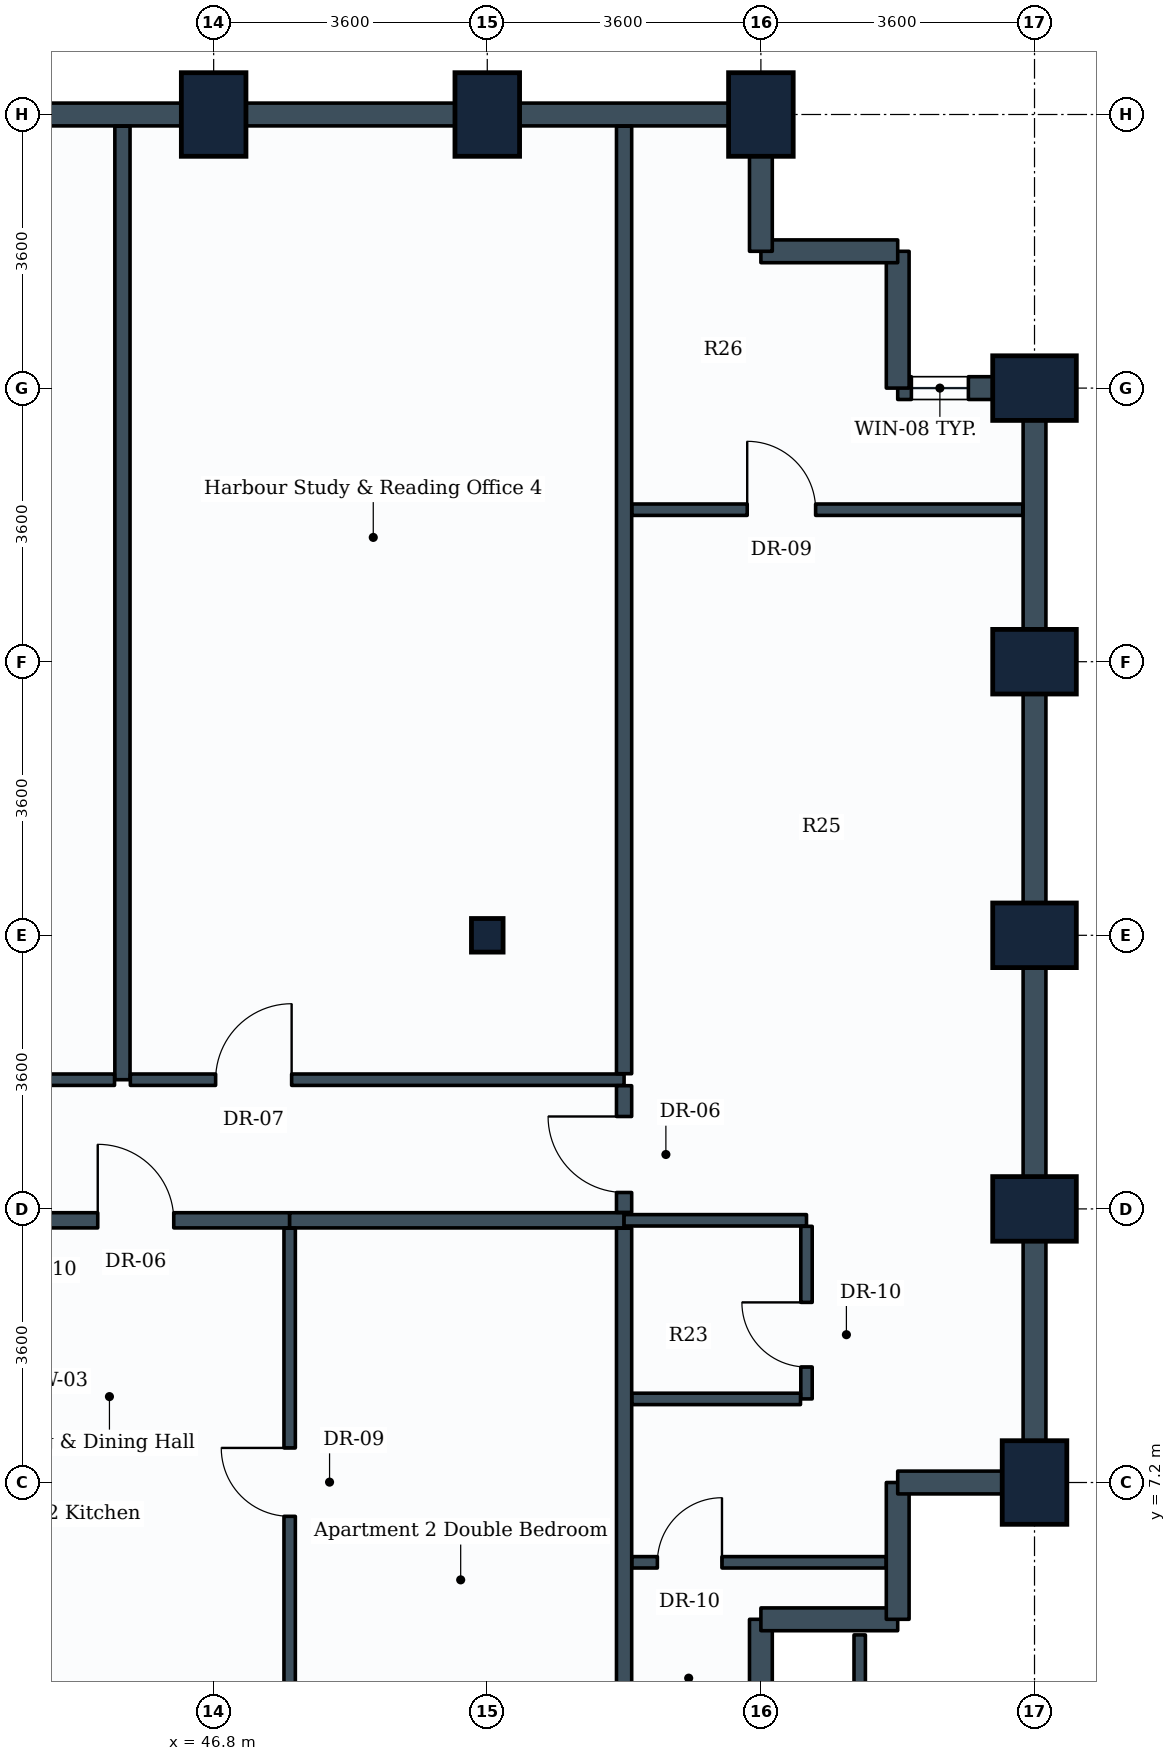
"""IFC4 building model, lengths in metres.
Left out: names, types, materials, properties, quantities, classifications, styles, units other than length and angle.
Written with IfcOpenShell. Run it as: python <this file> out.ifc"""

import sys

from ifc_helpers import new_model, si_unit, direction, frame, frame_2d, origin, origin_2d, place, context, subcontext, project, spatial, rectangle, i_section, extrude, element, fill, save


model = new_model("IFC4")
c1 = context("Model", 3, precision=1e-05, world=origin(), true_north=direction((0.0, 1.0)))
c2 = subcontext(c1, "Body", "Model", "MODEL_VIEW")
j1 = project(units=[si_unit("LENGTHUNIT", "METRE"), si_unit("PLANEANGLEUNIT", "RADIAN")], contexts=[c1])
p1 = place(None, origin())
s1 = spatial("IfcSite", under=j1, at=p1, CompositionType="ELEMENT")
p2 = place(p1, origin())
s2 = spatial("IfcBuilding", under=s1, at=p2, CompositionType="ELEMENT")
p3 = place(p2, frame((0.0, 0.0, 123.8)))
s3 = spatial("IfcBuildingStorey", under=s2, at=p3, CompositionType="ELEMENT", Elevation=123.8)
p4 = place(p3, frame((46.8, 25.2, 0.0), z_axis=(0.0, 0.0, 1.0), x_axis=(1.0, 0.0, 0.0)))
e1 = element("IfcColumn", 1, at=p4, inside=s3, PredefinedType="COLUMN", context=c2, shape_type="SweptSolid", body=[
    extrude(rectangle(XDim=0.85, YDim=1.1, at=origin_2d()), origin(), (0.0, 0.0, 1.0), 3.8),
])
p5 = place(p3, frame((50.4, 14.4, 0.0), z_axis=(0.0, 0.0, 1.0), x_axis=(1.0, 0.0, 0.0)))
e2 = element("IfcColumn", 2, at=p5, inside=s3, PredefinedType="COLUMN", context=c2, shape_type="SweptSolid", body=[
    extrude(i_section(OverallWidth=0.416, OverallDepth=0.442, WebThickness=0.025, FlangeThickness=0.041, FilletRadius=0.015, at=origin_2d()), origin(), (0.0, 0.0, 1.0), 3.8),
])
for number, where, z_axis, x_axis in (
    (3, (50.4, 25.2, 0.0), (0.0, 0.0, 1.0), (1.0, 0.0, 0.0)),
    (4, (54.0, 25.2, 0.0), (0.0, 0.0, 1.0), (1.0, 0.0, 0.0)),
    (5, (57.6, 7.2, 0.0), (0.0, 0.0, 1.0), (1.0, 0.0, 0.0)),
    (6, (57.6, 10.8, 0.0), (0.0, 0.0, 1.0), (0.0, 1.0, 0.0)),
    (7, (57.6, 14.4, 0.0), (0.0, 0.0, 1.0), (0.0, 1.0, 0.0)),
    (8, (57.6, 18.0, 0.0), (0.0, 0.0, 1.0), (0.0, 1.0, 0.0)),
    (9, (57.6, 21.6, 0.0), (0.0, 0.0, 1.0), (0.0, 1.0, 0.0)),
):
    element("IfcColumn", number, at=place(p3, frame(where, z_axis=z_axis, x_axis=x_axis)), inside=s3, PredefinedType="COLUMN", context=c2, shape_type="SweptSolid", body=[
        extrude(rectangle(XDim=0.85, YDim=1.1, at=origin_2d()), origin(), (0.0, 0.0, 1.0), 3.8),
    ])
p6 = place(p3, frame((54.0, 5.4, 0.0), z_axis=(0.0, 0.0, 1.0), x_axis=(0.0, -1.0, 0.0)))
e10 = element("IfcWall", 10, at=p6, inside=s3, PredefinedType="STANDARD", context=c2, shape_type="SweptSolid", body=[
    extrude(rectangle(XDim=1.8, YDim=0.3, at=frame_2d((0.9, 0.0))), origin(), (0.0, 0.0, 1.0), 2.43),
])
p7 = place(p3, frame((55.8, 5.4, 0.0), z_axis=(0.0, 0.0, 1.0), x_axis=(-1.0, 0.0, 0.0)))
e11 = element("IfcWall", 11, at=p7, inside=s3, PredefinedType="STANDARD", context=c2, shape_type="SweptSolid", body=[
    extrude(rectangle(XDim=1.8, YDim=0.3, at=frame_2d((0.9, 0.0))), origin(), (0.0, 0.0, 1.0), 2.43),
])
p8 = place(p3, frame((55.8, 7.2, 0.0), z_axis=(0.0, 0.0, 1.0), x_axis=(0.0, -1.0, 0.0)))
e12 = element("IfcWall", 12, at=p8, inside=s3, PredefinedType="STANDARD", context=c2, shape_type="SweptSolid", body=[
    extrude(rectangle(XDim=1.8, YDim=0.3, at=frame_2d((0.9, 0.0))), origin(), (0.0, 0.0, 1.0), 3.465),
])
p9 = place(p3, frame((57.6, 7.2, 0.0), z_axis=(0.0, 0.0, 1.0), x_axis=(-1.0, 0.0, 0.0)))
e13 = element("IfcWall", 13, at=p9, inside=s3, PredefinedType="STANDARD", context=c2, shape_type="SweptSolid", body=[
    extrude(rectangle(XDim=1.8, YDim=0.3, at=frame_2d((0.9, 0.0))), origin(), (0.0, 0.0, 1.0), 2.43),
])
p10 = place(p3, frame((57.6, 10.8, 0.0), z_axis=(0.0, 0.0, 1.0), x_axis=(0.0, -1.0, 0.0)))
e14 = element("IfcWall", 14, at=p10, inside=s3, PredefinedType="STANDARD", context=c2, shape_type="SweptSolid", body=[
    extrude(rectangle(XDim=3.6, YDim=0.3, at=frame_2d((1.8, 0.0))), origin(), (0.0, 0.0, 1.0), 2.43),
])
p11 = place(p3, frame((57.6, 14.4, 0.0), z_axis=(0.0, 0.0, 1.0), x_axis=(0.0, -1.0, 0.0)))
e15 = element("IfcWall", 15, at=p11, inside=s3, PredefinedType="STANDARD", context=c2, shape_type="SweptSolid", body=[
    extrude(rectangle(XDim=3.6, YDim=0.3, at=frame_2d((1.8, 0.0))), origin(), (0.0, 0.0, 1.0), 2.43),
])
for number, where, z_axis, x_axis in (
    (16, (57.6, 18.0, 0.0), (0.0, 0.0, 1.0), (0.0, -1.0, 0.0)),
    (17, (57.6, 21.6, 0.0), (0.0, 0.0, 1.0), (0.0, -1.0, 0.0)),
):
    element("IfcWall", number, at=place(p3, frame(where, z_axis=z_axis, x_axis=x_axis)), inside=s3, PredefinedType="STANDARD", context=c2, shape_type="SweptSolid", body=[
        extrude(rectangle(XDim=3.6, YDim=0.3, at=frame_2d((1.8, 0.0))), origin(), (0.0, 0.0, 1.0), 2.43),
    ])
p12 = place(p3, frame((55.8, 21.6, 0.0), z_axis=(0.0, 0.0, 1.0), x_axis=(1.0, 0.0, 0.0)))
e18 = element("IfcWall", 18, at=p12, inside=s3, PredefinedType="STANDARD", context=c2, shape_type="SweptSolid", body=[
    extrude(rectangle(XDim=1.8, YDim=0.3, at=frame_2d((0.9, 0.0))), origin(), (0.0, 0.0, 1.0), 2.43),
])
p13 = place(p12, frame((0.18, 0.0, 0.85)))
e19 = element("IfcOpeningElement", 19, at=p13, cuts=e18, PredefinedType="OPENING", context=c2, shape_type="SweptSolid", body=[
    extrude(rectangle(XDim=0.75, YDim=1.05, at=frame_2d((0.375, 0.525))), frame((0.0, 0.16, 0.0), z_axis=(0.0, -1.0, 0.0), x_axis=(1.0, 0.0, 0.0)), (0.0, 0.0, 1.0), 0.32),
])
p14 = place(p3, frame((55.8, 23.4, 0.0), z_axis=(0.0, 0.0, 1.0), x_axis=(0.0, -1.0, 0.0)))
e20 = element("IfcWall", 20, at=p14, inside=s3, PredefinedType="STANDARD", context=c2, shape_type="SweptSolid", body=[
    extrude(rectangle(XDim=1.8, YDim=0.3, at=frame_2d((0.9, 0.0))), origin(), (0.0, 0.0, 1.0), 3.465),
])
for number, where, z_axis, x_axis in (
    (21, (54.0, 23.4, 0.0), (0.0, 0.0, 1.0), (1.0, 0.0, 0.0)),
    (22, (54.0, 25.2, 0.0), (0.0, 0.0, 1.0), (0.0, -1.0, 0.0)),
):
    element("IfcWall", number, at=place(p3, frame(where, z_axis=z_axis, x_axis=x_axis)), inside=s3, PredefinedType="STANDARD", context=c2, shape_type="SweptSolid", body=[
        extrude(rectangle(XDim=1.8, YDim=0.3, at=frame_2d((0.9, 0.0))), origin(), (0.0, 0.0, 1.0), 2.43),
    ])
p15 = place(p3, frame((50.4, 25.2, 0.0), z_axis=(0.0, 0.0, 1.0), x_axis=(1.0, 0.0, 0.0)))
e23 = element("IfcWall", 23, at=p15, inside=s3, PredefinedType="STANDARD", context=c2, shape_type="SweptSolid", body=[
    extrude(rectangle(XDim=3.6, YDim=0.3, at=frame_2d((1.8, 0.0))), origin(), (0.0, 0.0, 1.0), 2.43),
])
p16 = place(p3, frame((46.8, 25.2, 0.0), z_axis=(0.0, 0.0, 1.0), x_axis=(1.0, 0.0, 0.0)))
e24 = element("IfcWall", 24, at=p16, inside=s3, PredefinedType="STANDARD", context=c2, shape_type="SweptSolid", body=[
    extrude(rectangle(XDim=3.6, YDim=0.3, at=frame_2d((1.8, 0.0))), origin(), (0.0, 0.0, 1.0), 2.93),
])
p17 = place(p3, frame((43.2, 25.2, 0.0), z_axis=(0.0, 0.0, 1.0), x_axis=(1.0, 0.0, 0.0)))
e25 = element("IfcWall", 25, at=p17, inside=s3, PredefinedType="STANDARD", context=c2, shape_type="SweptSolid", body=[
    extrude(rectangle(XDim=3.6, YDim=0.3, at=frame_2d((1.8, 0.0))), origin(), (0.0, 0.0, 1.0), 2.93),
])
p18 = place(p3, frame((43.75, 10.65, 0.0), z_axis=(0.0, 0.0, 1.0), x_axis=(1.0, 0.0, 0.0)))
e26 = element("IfcWall", 26, at=p18, inside=s3, PredefinedType="PARTITIONING", context=c2, shape_type="SweptSolid", body=[
    extrude(rectangle(XDim=4.05, YDim=0.2, at=frame_2d((2.025, 0.0))), origin(), (0.0, 0.0, 1.0), 3.1),
])
p19 = place(p18, frame((1.525, 0.0, 0.0)))
e27 = element("IfcOpeningElement", 27, at=p19, cuts=e26, PredefinedType="OPENING", context=c2, shape_type="SweptSolid", body=[
    extrude(rectangle(XDim=1.0, YDim=2.1, at=frame_2d((0.5, 1.05))), frame((0.0, 0.11, 0.0), z_axis=(0.0, -1.0, 0.0), x_axis=(1.0, 0.0, 0.0)), (0.0, 0.0, 1.0), 0.22),
])
p20 = place(p3, frame((47.8, 10.65, 0.0), z_axis=(0.0, 0.0, 1.0), x_axis=(1.0, 0.0, 0.0)))
e28 = element("IfcWall", 28, at=p20, inside=s3, PredefinedType="PARTITIONING", context=c2, shape_type="SweptSolid", body=[
    extrude(rectangle(XDim=4.4, YDim=0.2, at=frame_2d((2.2, 0.0))), origin(), (0.0, 0.0, 1.0), 3.465),
])
p21 = place(p3, frame((47.8, 3.754, 0.0), z_axis=(0.0, 0.0, 1.0), x_axis=(0.0, 1.0, 0.0)))
e29 = element("IfcWall", 29, at=p21, inside=s3, PredefinedType="PARTITIONING", context=c2, shape_type="SweptSolid", body=[
    extrude(rectangle(XDim=6.792, YDim=0.15, at=frame_2d((3.396, 0.0))), origin(), (0.0, 0.0, 1.0), 2.93),
])
p22 = place(p21, frame((3.001, 0.0, 0.0)))
e30 = element("IfcOpeningElement", 30, at=p22, cuts=e29, PredefinedType="OPENING", context=c2, shape_type="SweptSolid", body=[
    extrude(rectangle(XDim=0.9, YDim=2.1, at=frame_2d((0.45, 1.05))), frame((0.0, 0.085, 0.0), z_axis=(0.0, -1.0, 0.0), x_axis=(1.0, 0.0, 0.0)), (0.0, 0.0, 1.0), 0.17),
])
p23 = place(p3, frame((45.6, 12.5, 0.0), z_axis=(0.0, 0.0, 1.0), x_axis=(0.0, 1.0, 0.0)))
e31 = element("IfcWall", 31, at=p23, inside=s3, PredefinedType="PARTITIONING", context=c2, shape_type="SweptSolid", body=[
    extrude(rectangle(XDim=12.546, YDim=0.2, at=frame_2d((6.273, 0.0))), origin(), (0.0, 0.0, 1.0), 2.43),
])
p24 = place(p3, frame((39.0, 12.5, 0.0), z_axis=(0.0, 0.0, 1.0), x_axis=(1.0, 0.0, 0.0)))
e32 = element("IfcWall", 32, at=p24, inside=s3, PredefinedType="PARTITIONING", context=c2, shape_type="SweptSolid", body=[
    extrude(rectangle(XDim=6.496, YDim=0.15, at=frame_2d((3.248, 0.0))), origin(), (0.0, 0.0, 1.0), 3.11),
])
p25 = place(p24, frame((0.596, 0.0, 0.0)))
e33 = element("IfcOpeningElement", 33, at=p25, cuts=e32, PredefinedType="OPENING", context=c2, shape_type="SweptSolid", body=[
    extrude(rectangle(XDim=1.0, YDim=2.1, at=frame_2d((0.5, 1.05))), frame((0.0, 0.085, 0.0), z_axis=(0.0, -1.0, 0.0), x_axis=(1.0, 0.0, 0.0)), (0.0, 0.0, 1.0), 0.17),
])
p26 = place(p3, frame((45.704, 12.5, 0.0), z_axis=(0.0, 0.0, 1.0), x_axis=(1.0, 0.0, 0.0)))
e34 = element("IfcWall", 34, at=p26, inside=s3, PredefinedType="PARTITIONING", context=c2, shape_type="SweptSolid", body=[
    extrude(rectangle(XDim=6.496, YDim=0.15, at=frame_2d((3.248, 0.0))), origin(), (0.0, 0.0, 1.0), 3.11),
])
p27 = place(p26, frame((1.122, 0.0, 0.0)))
e35 = element("IfcOpeningElement", 35, at=p27, cuts=e34, PredefinedType="OPENING", context=c2, shape_type="SweptSolid", body=[
    extrude(rectangle(XDim=1.0, YDim=2.1, at=frame_2d((0.5, 1.05))), frame((0.0, 0.085, 0.0), z_axis=(0.0, -1.0, 0.0), x_axis=(1.0, 0.0, 0.0)), (0.0, 0.0, 1.0), 0.17),
])
p28 = place(p3, frame((52.2, 3.754, 0.0), z_axis=(0.0, 0.0, 1.0), x_axis=(0.0, 1.0, 0.0)))
e36 = element("IfcWall", 36, at=p28, inside=s3, PredefinedType="PARTITIONING", context=c2, shape_type="SweptSolid", body=[
    extrude(rectangle(XDim=6.792, YDim=0.2, at=frame_2d((3.396, 0.0))), origin(), (0.0, 0.0, 1.0), 3.465),
])
p29 = place(p3, frame((52.2, 12.579, 0.0), z_axis=(0.0, 0.0, 1.0), x_axis=(0.0, 1.0, 0.0)))
e37 = element("IfcWall", 37, at=p29, inside=s3, PredefinedType="PARTITIONING", context=c2, shape_type="SweptSolid", body=[
    extrude(rectangle(XDim=12.467, YDim=0.2, at=frame_2d((6.233, 0.0))), origin(), (0.0, 0.0, 1.0), 2.43),
])
p30 = place(p3, frame((52.2, 10.754, 0.0), z_axis=(0.0, 0.0, 1.0), x_axis=(0.0, 1.0, 0.0)))
e38 = element("IfcWall", 38, at=p30, inside=s3, PredefinedType="PARTITIONING", context=c2, shape_type="SweptSolid", body=[
    extrude(rectangle(XDim=1.667, YDim=0.2, at=frame_2d((0.833, 0.0))), origin(), (0.0, 0.0, 1.0), 3.465),
])
p31 = place(p30, frame((0.262, 0.0, 0.0)))
e39 = element("IfcOpeningElement", 39, at=p31, cuts=e38, PredefinedType="OPENING", context=c2, shape_type="SweptSolid", body=[
    extrude(rectangle(XDim=1.0, YDim=2.1, at=frame_2d((0.5, 1.05))), frame((0.0, 0.11, 0.0), z_axis=(0.0, -1.0, 0.0), x_axis=(1.0, 0.0, 0.0)), (0.0, 0.0, 1.0), 0.22),
])
p32 = place(p3, frame((52.2, 10.65, 0.0), z_axis=(0.0, 0.0, 1.0), x_axis=(1.0, 0.0, 0.0)))
e40 = element("IfcWall", 40, at=p32, inside=s3, PredefinedType="PARTITIONING", context=c2, shape_type="SweptSolid", body=[
    extrude(rectangle(XDim=2.4, YDim=0.15, at=frame_2d((1.2, 0.0))), origin(), (0.0, 0.0, 1.0), 2.43),
])
p33 = place(p3, frame((54.6, 8.3, 0.0), z_axis=(0.0, 0.0, 1.0), x_axis=(0.0, 1.0, 0.0)))
e41 = element("IfcWall", 41, at=p33, inside=s3, PredefinedType="PARTITIONING", context=c2, shape_type="SweptSolid", body=[
    extrude(rectangle(XDim=2.271, YDim=0.15, at=frame_2d((1.135, 0.0))), origin(), (0.0, 0.0, 1.0), 2.43),
])
p34 = place(p33, frame((0.42, 0.0, 0.0)))
e42 = element("IfcOpeningElement", 42, at=p34, cuts=e41, PredefinedType="OPENING", context=c2, shape_type="SweptSolid", body=[
    extrude(rectangle(XDim=0.85, YDim=2.1, at=frame_2d((0.425, 1.05))), frame((0.0, 0.085, 0.0), z_axis=(0.0, -1.0, 0.0), x_axis=(1.0, 0.0, 0.0)), (0.0, 0.0, 1.0), 0.17),
])
p35 = place(p3, frame((52.304, 8.3, 0.0), z_axis=(0.0, 0.0, 1.0), x_axis=(1.0, 0.0, 0.0)))
e43 = element("IfcWall", 43, at=p35, inside=s3, PredefinedType="PARTITIONING", context=c2, shape_type="SweptSolid", body=[
    extrude(rectangle(XDim=2.217, YDim=0.15, at=frame_2d((1.108, 0.0))), origin(), (0.0, 0.0, 1.0), 2.43),
])
p36 = place(p3, frame((52.304, 20.0, 0.0), z_axis=(0.0, 0.0, 1.0), x_axis=(1.0, 0.0, 0.0)))
e44 = element("IfcWall", 44, at=p36, inside=s3, PredefinedType="PARTITIONING", context=c2, shape_type="SweptSolid", body=[
    extrude(rectangle(XDim=5.142, YDim=0.15, at=frame_2d((2.571, 0.0))), origin(), (0.0, 0.0, 1.0), 2.43),
])
p37 = place(p36, frame((1.516, 0.0, 0.0)))
e45 = element("IfcOpeningElement", 45, at=p37, cuts=e44, PredefinedType="OPENING", context=c2, shape_type="SweptSolid", body=[
    extrude(rectangle(XDim=0.9, YDim=2.1, at=frame_2d((0.45, 1.05))), frame((0.0, 0.085, 0.0), z_axis=(0.0, -1.0, 0.0), x_axis=(1.0, 0.0, 0.0)), (0.0, 0.0, 1.0), 0.17),
])
p38 = place(p3, frame((52.304, 6.15, 0.0), z_axis=(0.0, 0.0, 1.0), x_axis=(1.0, 0.0, 0.0)))
e46 = element("IfcWall", 46, at=p38, inside=s3, PredefinedType="PARTITIONING", context=c2, shape_type="SweptSolid", body=[
    extrude(rectangle(XDim=3.342, YDim=0.15, at=frame_2d((1.671, 0.0))), origin(), (0.0, 0.0, 1.0), 2.43),
])
p39 = place(p38, frame((0.334, 0.0, 0.0)))
e47 = element("IfcOpeningElement", 47, at=p39, cuts=e46, PredefinedType="OPENING", context=c2, shape_type="SweptSolid", body=[
    extrude(rectangle(XDim=0.85, YDim=2.1, at=frame_2d((0.425, 1.05))), frame((0.0, 0.085, 0.0), z_axis=(0.0, -1.0, 0.0), x_axis=(1.0, 0.0, 0.0)), (0.0, 0.0, 1.0), 0.17),
])
p40 = place(p3, frame((55.3, 3.6, 0.0), z_axis=(0.0, 0.0, 1.0), x_axis=(0.0, 1.0, 0.0)))
e48 = element("IfcWall", 48, at=p40, inside=s3, PredefinedType="PARTITIONING", context=c2, shape_type="SweptSolid", body=[
    extrude(rectangle(XDim=1.595, YDim=0.15, at=frame_2d((0.797, 0.0))), origin(), (0.0, 0.0, 1.0), 3.465),
])
p41 = place(p19, origin())
e49 = element("IfcDoor", 49, at=p41, inside=s3, OperationType="SINGLE_SWING_LEFT", PredefinedType="DOOR", context=c2, shape_type="SweptSolid", body=[
    extrude(rectangle(XDim=1.0, YDim=2.1, at=frame_2d((0.5, 1.05))), frame((0.0, 0.025, 0.0), z_axis=(0.0, -1.0, 0.0), x_axis=(1.0, 0.0, 0.0)), (0.0, 0.0, 1.0), 0.05),
])
fill(e27, e49)
p42 = place(p22, origin())
e50 = element("IfcDoor", 50, at=p42, inside=s3, OperationType="SINGLE_SWING_RIGHT", PredefinedType="DOOR", context=c2, shape_type="SweptSolid", body=[
    extrude(rectangle(XDim=0.9, YDim=2.1, at=frame_2d((0.45, 1.05))), frame((0.0, 0.025, 0.0), z_axis=(0.0, -1.0, 0.0), x_axis=(1.0, 0.0, 0.0)), (0.0, 0.0, 1.0), 0.05),
])
fill(e30, e50)
p43 = place(p27, origin())
e51 = element("IfcDoor", 51, at=p43, inside=s3, OperationType="SINGLE_SWING_RIGHT", PredefinedType="DOOR", context=c2, shape_type="SweptSolid", body=[
    extrude(rectangle(XDim=1.0, YDim=2.1, at=frame_2d((0.5, 1.05))), frame((0.0, 0.025, 0.0), z_axis=(0.0, -1.0, 0.0), x_axis=(1.0, 0.0, 0.0)), (0.0, 0.0, 1.0), 0.05),
])
fill(e35, e51)
p44 = place(p31, origin())
e52 = element("IfcDoor", 52, at=p44, inside=s3, OperationType="SINGLE_SWING_RIGHT", PredefinedType="DOOR", context=c2, shape_type="SweptSolid", body=[
    extrude(rectangle(XDim=1.0, YDim=2.1, at=frame_2d((0.5, 1.05))), frame((0.0, 0.025, 0.0), z_axis=(0.0, -1.0, 0.0), x_axis=(1.0, 0.0, 0.0)), (0.0, 0.0, 1.0), 0.05),
])
fill(e39, e52)
p45 = place(p34, origin())
e53 = element("IfcDoor", 53, at=p45, inside=s3, OperationType="SINGLE_SWING_RIGHT", PredefinedType="DOOR", context=c2, shape_type="SweptSolid", body=[
    extrude(rectangle(XDim=0.85, YDim=2.1, at=frame_2d((0.425, 1.05))), frame((0.0, 0.025, 0.0), z_axis=(0.0, -1.0, 0.0), x_axis=(1.0, 0.0, 0.0)), (0.0, 0.0, 1.0), 0.05),
])
fill(e42, e53)
p46 = place(p37, origin())
e54 = element("IfcDoor", 54, at=p46, inside=s3, OperationType="SINGLE_SWING_LEFT", PredefinedType="DOOR", context=c2, shape_type="SweptSolid", body=[
    extrude(rectangle(XDim=0.9, YDim=2.1, at=frame_2d((0.45, 1.05))), frame((0.0, 0.025, 0.0), z_axis=(0.0, -1.0, 0.0), x_axis=(1.0, 0.0, 0.0)), (0.0, 0.0, 1.0), 0.05),
])
fill(e45, e54)
p47 = place(p39, origin())
e55 = element("IfcDoor", 55, at=p47, inside=s3, OperationType="SINGLE_SWING_RIGHT", PredefinedType="DOOR", context=c2, shape_type="SweptSolid", body=[
    extrude(rectangle(XDim=0.85, YDim=2.1, at=frame_2d((0.425, 1.05))), frame((0.0, 0.025, 0.0), z_axis=(0.0, -1.0, 0.0), x_axis=(1.0, 0.0, 0.0)), (0.0, 0.0, 1.0), 0.05),
])
fill(e47, e55)
p48 = place(p13, origin())
e56 = element("IfcWindow", 56, at=p48, inside=s3, PartitioningType="SINGLE_PANEL", PredefinedType="WINDOW", context=c2, shape_type="SweptSolid", body=[
    extrude(rectangle(XDim=0.75, YDim=1.05, at=frame_2d((0.375, 0.525))), frame((0.0, 0.03, 0.0), z_axis=(0.0, -1.0, 0.0), x_axis=(1.0, 0.0, 0.0)), (0.0, 0.0, 1.0), 0.06),
])
fill(e19, e56)
save(model, sys.argv[1])
